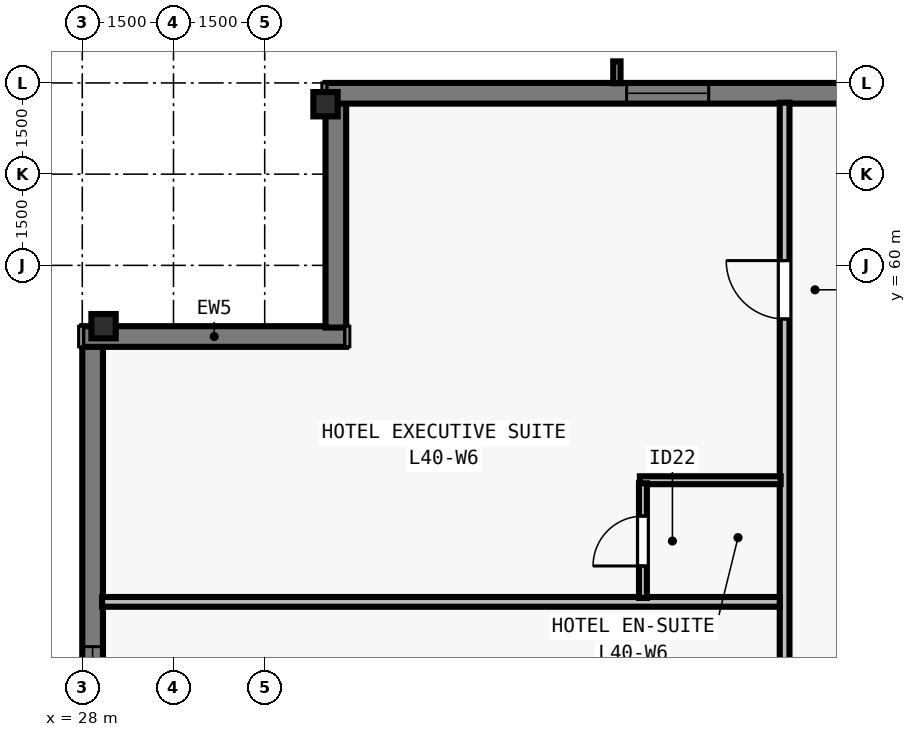
"""IFC4 building model, lengths in metres.
Left out: names, types, materials, properties, quantities, classifications, styles, units other than length and angle.
Written with IfcOpenShell. Run it as: python <this file> out.ifc"""

import sys

from ifc_helpers import new_model, si_unit, direction, frame, frame_2d, origin, origin_2d, place, context, subcontext, project, spatial, rectangle, i_section, extrude, element, fill, save


model = new_model("IFC4")
c1 = context("Model", 3, precision=1e-05, world=origin(), true_north=direction((0.0, 1.0)))
c2 = subcontext(c1, "Body", "Model", "MODEL_VIEW")
j1 = project(units=[si_unit("LENGTHUNIT", "METRE"), si_unit("PLANEANGLEUNIT", "RADIAN")], contexts=[c1])
p1 = place(None, origin())
s1 = spatial("IfcSite", under=j1, at=p1, CompositionType="ELEMENT")
p2 = place(p1, origin())
s2 = spatial("IfcBuilding", under=s1, at=p2, CompositionType="ELEMENT")
p3 = place(p2, frame((0.0, 0.0, 148.0)))
s3 = spatial("IfcBuildingStorey", under=s2, at=p3, CompositionType="ELEMENT", Elevation=148.0)
for number, where, z_axis, x_axis in (
    (1, (32.0, 62.65, 0.0), (0.0, 0.0, 1.0), (1.0, 0.0, 0.0)),
    (2, (28.35, 59.0, 0.0), (0.0, 0.0, 1.0), (0.0, 1.0, 0.0)),
):
    element("IfcColumn", number, at=place(p3, frame(where, z_axis=z_axis, x_axis=x_axis)), inside=s3, PredefinedType="COLUMN", context=c2, shape_type="SweptSolid", body=[
        extrude(i_section(OverallWidth=0.4, OverallDepth=0.4, WebThickness=0.022, FlangeThickness=0.036, at=origin_2d()), origin(), (0.0, 0.0, 1.0), 3.5),
    ])
p4 = place(p3, frame((28.17, 19.0, 0.0), z_axis=(0.0, 0.0, 1.0), x_axis=(0.0, 1.0, 0.0)))
e3 = element("IfcWall", 3, at=p4, inside=s3, PredefinedType="SOLIDWALL", context=c2, shape_type="SweptSolid", body=[
    extrude(rectangle(XDim=39.682, YDim=0.34, at=frame_2d((19.841, 0.0))), origin(), (0.0, 0.0, 1.0), 3.28),
])
p5 = place(p4, frame((4.952, 0.0, 0.8)))
e4 = element("IfcOpeningElement", 4, at=p5, cuts=e3, PredefinedType="OPENING", context=c2, shape_type="SweptSolid", body=[
    extrude(rectangle(XDim=1.35, YDim=1.66, at=frame_2d((0.675, 0.83))), frame((0.0, 0.18, 0.0), z_axis=(0.0, -1.0, 0.0), x_axis=(1.0, 0.0, 0.0)), (0.0, 0.0, 1.0), 0.36),
])
p6 = place(p4, frame((8.305, 0.0, 0.8)))
e5 = element("IfcOpeningElement", 5, at=p6, cuts=e3, PredefinedType="OPENING", context=c2, shape_type="SweptSolid", body=[
    extrude(rectangle(XDim=1.75, YDim=1.66, at=frame_2d((0.875, 0.83))), frame((0.0, 0.18, 0.0), z_axis=(0.0, -1.0, 0.0), x_axis=(1.0, 0.0, 0.0)), (0.0, 0.0, 1.0), 0.36),
])
p7 = place(p4, frame((12.909, 0.0, 0.8)))
e6 = element("IfcOpeningElement", 6, at=p7, cuts=e3, PredefinedType="OPENING", context=c2, shape_type="SweptSolid", body=[
    extrude(rectangle(XDim=1.35, YDim=1.66, at=frame_2d((0.675, 0.83))), frame((0.0, 0.18, 0.0), z_axis=(0.0, -1.0, 0.0), x_axis=(1.0, 0.0, 0.0)), (0.0, 0.0, 1.0), 0.36),
])
p8 = place(p4, frame((16.262, 0.0, 0.8)))
e7 = element("IfcOpeningElement", 7, at=p8, cuts=e3, PredefinedType="OPENING", context=c2, shape_type="SweptSolid", body=[
    extrude(rectangle(XDim=1.75, YDim=1.66, at=frame_2d((0.875, 0.83))), frame((0.0, 0.18, 0.0), z_axis=(0.0, -1.0, 0.0), x_axis=(1.0, 0.0, 0.0)), (0.0, 0.0, 1.0), 0.36),
])
p9 = place(p4, frame((20.416, 0.0, 0.8)))
e8 = element("IfcOpeningElement", 8, at=p9, cuts=e3, PredefinedType="OPENING", context=c2, shape_type="SweptSolid", body=[
    extrude(rectangle(XDim=1.35, YDim=1.66, at=frame_2d((0.675, 0.83))), frame((0.0, 0.18, 0.0), z_axis=(0.0, -1.0, 0.0), x_axis=(1.0, 0.0, 0.0)), (0.0, 0.0, 1.0), 0.36),
])
p10 = place(p4, frame((22.07, 0.0, 0.8)))
e9 = element("IfcOpeningElement", 9, at=p10, cuts=e3, PredefinedType="OPENING", context=c2, shape_type="SweptSolid", body=[
    extrude(rectangle(XDim=1.75, YDim=1.66, at=frame_2d((0.875, 0.83))), frame((0.0, 0.18, 0.0), z_axis=(0.0, -1.0, 0.0), x_axis=(1.0, 0.0, 0.0)), (0.0, 0.0, 1.0), 0.36),
])
p11 = place(p4, frame((26.273, 0.0, 0.8)))
e10 = element("IfcOpeningElement", 10, at=p11, cuts=e3, PredefinedType="OPENING", context=c2, shape_type="SweptSolid", body=[
    extrude(rectangle(XDim=1.35, YDim=1.66, at=frame_2d((0.675, 0.83))), frame((0.0, 0.18, 0.0), z_axis=(0.0, -1.0, 0.0), x_axis=(1.0, 0.0, 0.0)), (0.0, 0.0, 1.0), 0.36),
])
p12 = place(p4, frame((29.627, 0.0, 0.8)))
e11 = element("IfcOpeningElement", 11, at=p12, cuts=e3, PredefinedType="OPENING", context=c2, shape_type="SweptSolid", body=[
    extrude(rectangle(XDim=1.75, YDim=1.66, at=frame_2d((0.875, 0.83))), frame((0.0, 0.18, 0.0), z_axis=(0.0, -1.0, 0.0), x_axis=(1.0, 0.0, 0.0)), (0.0, 0.0, 1.0), 0.36),
])
p13 = place(p4, frame((33.38, 0.0, 0.8)))
e12 = element("IfcOpeningElement", 12, at=p13, cuts=e3, PredefinedType="OPENING", context=c2, shape_type="SweptSolid", body=[
    extrude(rectangle(XDim=1.35, YDim=1.66, at=frame_2d((0.675, 0.83))), frame((0.0, 0.18, 0.0), z_axis=(0.0, -1.0, 0.0), x_axis=(1.0, 0.0, 0.0)), (0.0, 0.0, 1.0), 0.36),
])
p14 = place(p3, frame((28.0, 58.83, 0.0), z_axis=(0.0, 0.0, 1.0), x_axis=(1.0, 0.0, 0.0)))
e13 = element("IfcWall", 13, at=p14, inside=s3, PredefinedType="SOLIDWALL", context=c2, shape_type="SweptSolid", body=[
    extrude(rectangle(XDim=4.34, YDim=0.34, at=frame_2d((2.17, 0.0))), origin(), (0.0, 0.0, 1.0), 3.28),
])
p15 = place(p3, frame((32.17, 58.978, 0.0), z_axis=(0.0, 0.0, 1.0), x_axis=(0.0, 1.0, 0.0)))
e14 = element("IfcWall", 14, at=p15, inside=s3, PredefinedType="SOLIDWALL", context=c2, shape_type="SweptSolid", body=[
    extrude(rectangle(XDim=3.704, YDim=0.34, at=frame_2d((1.852, 0.0))), origin(), (0.0, 0.0, 1.0), 3.28),
])
p16 = place(p3, frame((32.0, 62.83, 0.0), z_axis=(0.0, 0.0, 1.0), x_axis=(1.0, 0.0, 0.0)))
e15 = element("IfcWall", 15, at=p16, inside=s3, PredefinedType="SOLIDWALL", context=c2, shape_type="SweptSolid", body=[
    extrude(rectangle(XDim=39.682, YDim=0.34, at=frame_2d((19.841, 0.0))), origin(), (0.0, 0.0, 1.0), 3.28),
])
p17 = place(p16, frame((4.952, 0.0, 0.8)))
e16 = element("IfcOpeningElement", 16, at=p17, cuts=e15, PredefinedType="OPENING", context=c2, shape_type="SweptSolid", body=[
    extrude(rectangle(XDim=1.35, YDim=1.66, at=frame_2d((0.675, 0.83))), frame((0.0, 0.18, 0.0), z_axis=(0.0, -1.0, 0.0), x_axis=(1.0, 0.0, 0.0)), (0.0, 0.0, 1.0), 0.36),
])
p18 = place(p16, frame((12.059, 0.0, 0.8)))
e17 = element("IfcOpeningElement", 17, at=p18, cuts=e15, PredefinedType="OPENING", context=c2, shape_type="SweptSolid", body=[
    extrude(rectangle(XDim=1.35, YDim=1.66, at=frame_2d((0.675, 0.83))), frame((0.0, 0.18, 0.0), z_axis=(0.0, -1.0, 0.0), x_axis=(1.0, 0.0, 0.0)), (0.0, 0.0, 1.0), 0.36),
])
p19 = place(p16, frame((16.262, 0.0, 0.8)))
e18 = element("IfcOpeningElement", 18, at=p19, cuts=e15, PredefinedType="OPENING", context=c2, shape_type="SweptSolid", body=[
    extrude(rectangle(XDim=1.75, YDim=1.66, at=frame_2d((0.875, 0.83))), frame((0.0, 0.18, 0.0), z_axis=(0.0, -1.0, 0.0), x_axis=(1.0, 0.0, 0.0)), (0.0, 0.0, 1.0), 0.36),
])
p20 = place(p16, frame((18.316, 0.0, 0.8)))
e19 = element("IfcOpeningElement", 19, at=p20, cuts=e15, PredefinedType="OPENING", context=c2, shape_type="SweptSolid", body=[
    extrude(rectangle(XDim=1.35, YDim=1.66, at=frame_2d((0.675, 0.83))), frame((0.0, 0.18, 0.0), z_axis=(0.0, -1.0, 0.0), x_axis=(1.0, 0.0, 0.0)), (0.0, 0.0, 1.0), 0.36),
])
p21 = place(p16, frame((22.07, 0.0, 0.8)))
e20 = element("IfcOpeningElement", 20, at=p21, cuts=e15, PredefinedType="OPENING", context=c2, shape_type="SweptSolid", body=[
    extrude(rectangle(XDim=1.75, YDim=1.66, at=frame_2d((0.875, 0.83))), frame((0.0, 0.18, 0.0), z_axis=(0.0, -1.0, 0.0), x_axis=(1.0, 0.0, 0.0)), (0.0, 0.0, 1.0), 0.36),
])
p22 = place(p16, frame((26.273, 0.0, 0.8)))
e21 = element("IfcOpeningElement", 21, at=p22, cuts=e15, PredefinedType="OPENING", context=c2, shape_type="SweptSolid", body=[
    extrude(rectangle(XDim=1.35, YDim=1.66, at=frame_2d((0.675, 0.83))), frame((0.0, 0.18, 0.0), z_axis=(0.0, -1.0, 0.0), x_axis=(1.0, 0.0, 0.0)), (0.0, 0.0, 1.0), 0.36),
])
p23 = place(p16, frame((29.627, 0.0, 0.8)))
e22 = element("IfcOpeningElement", 22, at=p23, cuts=e15, PredefinedType="OPENING", context=c2, shape_type="SweptSolid", body=[
    extrude(rectangle(XDim=1.75, YDim=1.66, at=frame_2d((0.875, 0.83))), frame((0.0, 0.18, 0.0), z_axis=(0.0, -1.0, 0.0), x_axis=(1.0, 0.0, 0.0)), (0.0, 0.0, 1.0), 0.36),
])
p24 = place(p3, frame((39.55, 15.325, 0.0), z_axis=(0.0, 0.0, 1.0), x_axis=(0.0, 1.0, 0.0)))
e23 = element("IfcWall", 23, at=p24, inside=s3, PredefinedType="PARTITIONING", context=c2, shape_type="SweptSolid", body=[
    extrude(rectangle(XDim=47.35, YDim=0.16, at=frame_2d((23.675, 0.0))), origin(), (0.0, 0.0, 1.0), 2.555),
])
p25 = place(p24, frame((4.718, 0.0, 0.0)))
e24 = element("IfcOpeningElement", 24, at=p25, cuts=e23, PredefinedType="OPENING", context=c2, shape_type="SweptSolid", body=[
    extrude(rectangle(XDim=0.96, YDim=2.15, at=frame_2d((0.48, 1.075))), frame((0.0, 0.09, 0.0), z_axis=(0.0, -1.0, 0.0), x_axis=(1.0, 0.0, 0.0)), (0.0, 0.0, 1.0), 0.18),
])
p26 = place(p24, frame((12.441, 0.0, 0.0)))
e25 = element("IfcOpeningElement", 25, at=p26, cuts=e23, PredefinedType="OPENING", context=c2, shape_type="SweptSolid", body=[
    extrude(rectangle(XDim=0.96, YDim=2.15, at=frame_2d((0.48, 1.075))), frame((0.0, 0.09, 0.0), z_axis=(0.0, -1.0, 0.0), x_axis=(1.0, 0.0, 0.0)), (0.0, 0.0, 1.0), 0.18),
])
p27 = place(p24, frame((20.301, 0.0, 0.0)))
e26 = element("IfcOpeningElement", 26, at=p27, cuts=e23, PredefinedType="OPENING", context=c2, shape_type="SweptSolid", body=[
    extrude(rectangle(XDim=0.96, YDim=2.15, at=frame_2d((0.48, 1.075))), frame((0.0, 0.09, 0.0), z_axis=(0.0, -1.0, 0.0), x_axis=(1.0, 0.0, 0.0)), (0.0, 0.0, 1.0), 0.18),
])
p28 = place(p24, frame((28.161, 0.0, 0.0)))
e27 = element("IfcOpeningElement", 27, at=p28, cuts=e23, PredefinedType="OPENING", context=c2, shape_type="SweptSolid", body=[
    extrude(rectangle(XDim=0.96, YDim=2.15, at=frame_2d((0.48, 1.075))), frame((0.0, 0.09, 0.0), z_axis=(0.0, -1.0, 0.0), x_axis=(1.0, 0.0, 0.0)), (0.0, 0.0, 1.0), 0.18),
])
p29 = place(p24, frame((36.021, 0.0, 0.0)))
e28 = element("IfcOpeningElement", 28, at=p29, cuts=e23, PredefinedType="OPENING", context=c2, shape_type="SweptSolid", body=[
    extrude(rectangle(XDim=0.96, YDim=2.15, at=frame_2d((0.48, 1.075))), frame((0.0, 0.09, 0.0), z_axis=(0.0, -1.0, 0.0), x_axis=(1.0, 0.0, 0.0)), (0.0, 0.0, 1.0), 0.18),
])
p30 = place(p24, frame((43.793, 0.0, 0.0)))
e29 = element("IfcOpeningElement", 29, at=p30, cuts=e23, PredefinedType="OPENING", context=c2, shape_type="SweptSolid", body=[
    extrude(rectangle(XDim=0.96, YDim=2.15, at=frame_2d((0.48, 1.075))), frame((0.0, 0.09, 0.0), z_axis=(0.0, -1.0, 0.0), x_axis=(1.0, 0.0, 0.0)), (0.0, 0.0, 1.0), 0.18),
])
p31 = place(p3, frame((28.325, 54.467, 0.0), z_axis=(0.0, 0.0, 1.0), x_axis=(1.0, 0.0, 0.0)))
e30 = element("IfcWall", 30, at=p31, inside=s3, PredefinedType="PARTITIONING", context=c2, shape_type="SweptSolid", body=[
    extrude(rectangle(XDim=11.145, YDim=0.16, at=frame_2d((5.573, 0.0))), origin(), (0.0, 0.0, 1.0), 2.896),
])
p32 = place(p3, frame((37.17, 56.467, 0.0), z_axis=(0.0, 0.0, 1.0), x_axis=(1.0, 0.0, 0.0)))
e31 = element("IfcWall", 31, at=p32, inside=s3, PredefinedType="PLUMBINGWALL", context=c2, shape_type="SweptSolid", body=[
    extrude(rectangle(XDim=2.315, YDim=0.13, at=frame_2d((1.158, 0.0))), origin(), (0.0, 0.0, 1.0), 3.28),
])
p33 = place(p3, frame((37.22, 54.531, 0.0), z_axis=(0.0, 0.0, 1.0), x_axis=(0.0, 1.0, 0.0)))
e32 = element("IfcWall", 32, at=p33, inside=s3, PredefinedType="PLUMBINGWALL", context=c2, shape_type="SweptSolid", body=[
    extrude(rectangle(XDim=1.885, YDim=0.13, at=frame_2d((0.942, 0.0))), origin(), (0.0, 0.0, 1.0), 2.555),
])
p34 = place(p33, frame((0.525, 0.0, 0.0)))
e33 = element("IfcOpeningElement", 33, at=p34, cuts=e32, PredefinedType="OPENING", context=c2, shape_type="SweptSolid", body=[
    extrude(rectangle(XDim=0.82, YDim=2.1, at=frame_2d((0.41, 1.05))), frame((0.0, 0.075, 0.0), z_axis=(0.0, -1.0, 0.0), x_axis=(1.0, 0.0, 0.0)), (0.0, 0.0, 1.0), 0.15),
])
p35 = place(p13, origin())
e34 = element("IfcWindow", 34, at=p35, inside=s3, PartitioningType="SINGLE_PANEL", PredefinedType="WINDOW", context=c2, shape_type="SweptSolid", body=[
    extrude(rectangle(XDim=1.35, YDim=1.66, at=frame_2d((0.675, 0.83))), frame((0.0, -0.05, 0.0), z_axis=(0.0, -1.0, 0.0), x_axis=(1.0, 0.0, 0.0)), (0.0, 0.0, 1.0), 0.06),
])
fill(e12, e34)
p36 = place(p17, origin())
e35 = element("IfcWindow", 35, at=p36, inside=s3, PartitioningType="SINGLE_PANEL", PredefinedType="WINDOW", context=c2, shape_type="SweptSolid", body=[
    extrude(rectangle(XDim=1.35, YDim=1.66, at=frame_2d((0.675, 0.83))), frame((0.0, -0.05, 0.0), z_axis=(0.0, -1.0, 0.0), x_axis=(1.0, 0.0, 0.0)), (0.0, 0.0, 1.0), 0.06),
])
fill(e16, e35)
p37 = place(p34, origin())
e36 = element("IfcDoor", 36, at=p37, inside=s3, OperationType="SINGLE_SWING_LEFT", PredefinedType="DOOR", context=c2, shape_type="SweptSolid", body=[
    extrude(rectangle(XDim=0.82, YDim=2.1, at=frame_2d((0.41, 1.05))), frame((0.0, 0.025, 0.0), z_axis=(0.0, -1.0, 0.0), x_axis=(1.0, 0.0, 0.0)), (0.0, 0.0, 1.0), 0.05),
])
fill(e33, e36)
p38 = place(p30, origin())
e37 = element("IfcDoor", 37, at=p38, inside=s3, OperationType="SINGLE_SWING_RIGHT", PredefinedType="DOOR", context=c2, shape_type="SweptSolid", body=[
    extrude(rectangle(XDim=0.96, YDim=2.15, at=frame_2d((0.48, 1.075))), frame((0.0, 0.025, 0.0), z_axis=(0.0, -1.0, 0.0), x_axis=(1.0, 0.0, 0.0)), (0.0, 0.0, 1.0), 0.05),
])
fill(e29, e37)
save(model, sys.argv[1])
